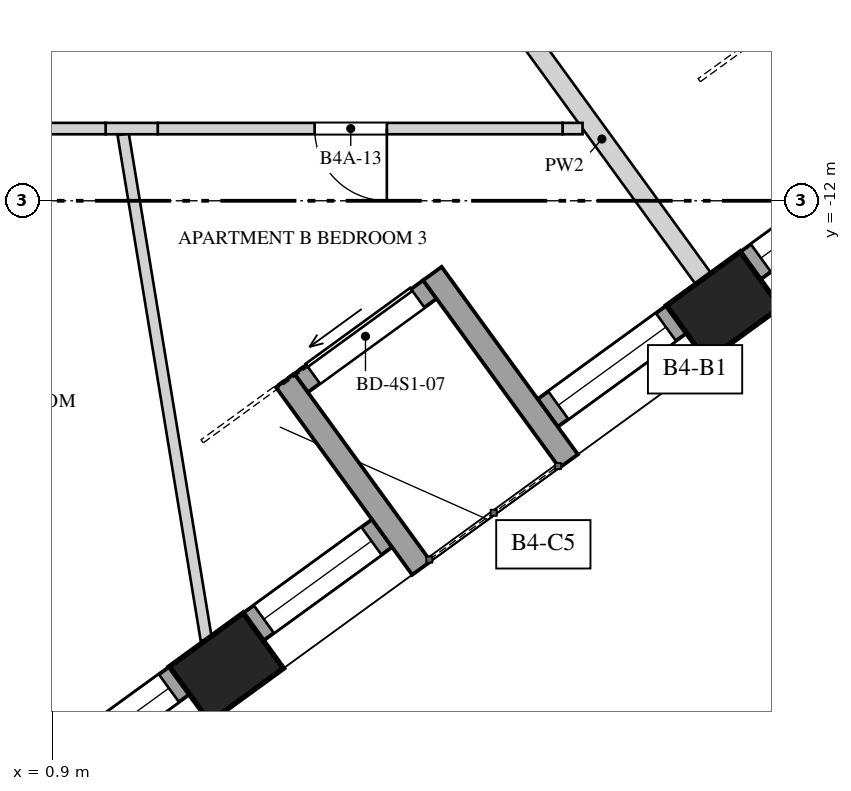
"""IFC4 building model, lengths in metres.
Left out: names, types, materials, properties, quantities, classifications, styles, units other than length and angle.
Written with IfcOpenShell. Run it as: python <this file> out.ifc"""

import sys

from ifc_helpers import new_model, si_unit, direction, frame, frame_2d, origin, origin_2d, place, context, subcontext, project, spatial, rectangle, extrude, element, fill, save


model = new_model("IFC4")
c1 = context("Model", 3, precision=1e-05, world=origin(), true_north=direction((0.0, 1.0)))
c2 = subcontext(c1, "Body", "Model", "MODEL_VIEW")
j1 = project(units=[si_unit("LENGTHUNIT", "METRE"), si_unit("PLANEANGLEUNIT", "RADIAN")], contexts=[c1])
p1 = place(None, origin())
s1 = spatial("IfcSite", under=j1, at=p1, CompositionType="ELEMENT")
p2 = place(p1, origin())
s2 = spatial("IfcBuilding", under=s1, at=p2, CompositionType="ELEMENT")
p3 = place(p2, frame((0.0, 0.0, 162.8)))
s3 = spatial("IfcBuildingStorey", under=s2, at=p3, CompositionType="ELEMENT", Elevation=162.8)
for number, where, z_axis, x_axis in (
    (1, (3.189, -18.14, -0.35), (0.0, 0.0, 1.0), (0.809, 0.588, 0.0)),
    (2, (9.728, -13.389, -0.35), (0.0, 0.0, 1.0), (0.809, 0.588, 0.0)),
):
    element("IfcColumn", number, at=place(p3, frame(where, z_axis=z_axis, x_axis=x_axis)), inside=s3, PredefinedType="COLUMN", context=c2, shape_type="SweptSolid", body=[
        extrude(rectangle(XDim=1.2, YDim=0.9, at=origin_2d()), origin(), (0.0, 0.0, 1.0), 4.35),
    ])
p4 = place(p3, frame((-2.997, -22.356, 0.0), z_axis=(0.0, 0.0, 1.0), x_axis=(0.809016690404, 0.587785670672, 0.0)))
e3 = element("IfcWall", 3, at=p4, inside=s3, PredefinedType="SOLIDWALL", context=c2, shape_type="SweptSolid", body=[
    extrude(rectangle(XDim=6.883, YDim=0.45, at=frame_2d((3.441, 0.0))), origin(), (0.0, 0.0, 1.0), 3.3),
])
p5 = place(p4, frame((0.497, 0.0, 0.5)))
e4 = element("IfcOpeningElement", 4, at=p5, cuts=e3, PredefinedType="OPENING", context=c2, shape_type="SweptSolid", body=[
    extrude(rectangle(XDim=1.1, YDim=2.65, at=frame_2d((0.55, 1.325))), frame((0.0, 0.235, 0.0), z_axis=(0.0, -1.0, 0.0), x_axis=(1.0, 0.0, 0.0)), (0.0, 0.0, 1.0), 0.47),
])
p6 = place(p4, frame((2.566, 0.0, 0.5)))
e5 = element("IfcOpeningElement", 5, at=p6, cuts=e3, PredefinedType="OPENING", context=c2, shape_type="SweptSolid", body=[
    extrude(rectangle(XDim=1.75, YDim=2.65, at=frame_2d((0.875, 1.325))), frame((0.0, 0.235, 0.0), z_axis=(0.0, -1.0, 0.0), x_axis=(1.0, 0.0, 0.0)), (0.0, 0.0, 1.0), 0.47),
])
p7 = place(p4, frame((4.961, 0.0, 0.5)))
e6 = element("IfcOpeningElement", 6, at=p7, cuts=e3, PredefinedType="OPENING", context=c2, shape_type="SweptSolid", body=[
    extrude(rectangle(XDim=1.75, YDim=2.65, at=frame_2d((0.875, 1.325))), frame((0.0, 0.235, 0.0), z_axis=(0.0, -1.0, 0.0), x_axis=(1.0, 0.0, 0.0)), (0.0, 0.0, 1.0), 0.47),
])
p8 = place(p3, frame((3.542, -17.605, 0.0), z_axis=(0.0, 0.0, 1.0), x_axis=(0.809028366311, 0.587769599847, 0.0)))
e7 = element("IfcWall", 7, at=p8, inside=s3, PredefinedType="SOLIDWALL", context=c2, shape_type="SweptSolid", body=[
    extrude(rectangle(XDim=2.094, YDim=0.45, at=frame_2d((1.047, 0.0))), origin(), (0.0, 0.0, 1.0), 3.3),
])
p9 = place(p8, frame((0.172, 0.0, 0.5)))
e8 = element("IfcOpeningElement", 8, at=p9, cuts=e7, PredefinedType="OPENING", context=c2, shape_type="SweptSolid", body=[
    extrude(rectangle(XDim=1.75, YDim=2.65, at=frame_2d((0.875, 1.325))), frame((0.0, 0.235, 0.0), z_axis=(0.0, -1.0, 0.0), x_axis=(1.0, 0.0, 0.0)), (0.0, 0.0, 1.0), 0.47),
])
p10 = place(p3, frame((7.416, -14.791, 0.0), z_axis=(0.0, 0.0, 1.0), x_axis=(0.809028366311, 0.587769599847, 0.0)))
e9 = element("IfcWall", 9, at=p10, inside=s3, PredefinedType="SOLIDWALL", context=c2, shape_type="SweptSolid", body=[
    extrude(rectangle(XDim=2.094, YDim=0.45, at=frame_2d((1.047, 0.0))), origin(), (0.0, 0.0, 1.0), 3.3),
])
p11 = place(p10, frame((0.172, 0.0, 0.5)))
e10 = element("IfcOpeningElement", 10, at=p11, cuts=e9, PredefinedType="OPENING", context=c2, shape_type="SweptSolid", body=[
    extrude(rectangle(XDim=1.75, YDim=2.65, at=frame_2d((0.875, 1.325))), frame((0.0, 0.235, 0.0), z_axis=(0.0, -1.0, 0.0), x_axis=(1.0, 0.0, 0.0)), (0.0, 0.0, 1.0), 0.47),
])
p12 = place(p3, frame((10.081, -12.854, 0.0), z_axis=(0.0, 0.0, 1.0), x_axis=(0.809028366311, 0.587769599847, 0.0)))
e11 = element("IfcWall", 11, at=p12, inside=s3, PredefinedType="SOLIDWALL", context=c2, shape_type="SweptSolid", body=[
    extrude(rectangle(XDim=2.094, YDim=0.45, at=frame_2d((1.047, 0.0))), origin(), (0.0, 0.0, 1.0), 3.3),
])
p13 = place(p12, frame((0.172, 0.0, 0.5)))
e12 = element("IfcOpeningElement", 12, at=p13, cuts=e11, PredefinedType="OPENING", context=c2, shape_type="SweptSolid", body=[
    extrude(rectangle(XDim=1.75, YDim=2.65, at=frame_2d((0.875, 1.325))), frame((0.0, 0.235, 0.0), z_axis=(0.0, -1.0, 0.0), x_axis=(1.0, 0.0, 0.0)), (0.0, 0.0, 1.0), 0.47),
])
p14 = place(p3, frame((4.171, -14.398, 0.0), z_axis=(0.0, 0.0, 1.0), x_axis=(0.809028366311, 0.587769599847, 0.0)))
e13 = element("IfcWall", 13, at=p14, inside=s3, PredefinedType="SOLIDWALL", context=c2, shape_type="SweptSolid", body=[
    extrude(rectangle(XDim=2.094, YDim=0.3, at=frame_2d((1.047, 0.0))), origin(), (0.0, 0.0, 1.0), 3.3),
])
p15 = place(p14, frame((0.197, 0.0, 0.0)))
e14 = element("IfcOpeningElement", 14, at=p15, cuts=e13, PredefinedType="OPENING", context=c2, shape_type="SweptSolid", body=[
    extrude(rectangle(XDim=1.7, YDim=2.45, at=frame_2d((0.85, 1.225))), frame((0.0, 0.16, 0.0), z_axis=(0.0, -1.0, 0.0), x_axis=(1.0, 0.0, 0.0)), (0.0, 0.0, 1.0), 0.32),
])
for number, where, z_axis, x_axis in (
    (15, (5.754, -16.833, 0.0), (0.0, 0.0, 1.0), (-0.588, 0.809, 0.0)),
    (16, (7.691, -15.425, 0.0), (0.0, 0.0, 1.0), (-0.588, 0.809, 0.0)),
):
    element("IfcWall", number, at=place(p3, frame(where, z_axis=z_axis, x_axis=x_axis)), inside=s3, PredefinedType="SOLIDWALL", context=c2, shape_type="SweptSolid", body=[
        extrude(rectangle(XDim=3.05, YDim=0.3, at=frame_2d((1.525, 0.0))), origin(), (0.0, 0.0, 1.0), 3.3),
    ])
p16 = place(p3, frame((1.83, -11.125, 0.0), z_axis=(0.0, 0.0, 1.0), x_axis=(0.162301772149, -0.98674116908, 0.0)))
e17 = element("IfcWall", 17, at=p16, inside=s3, PredefinedType="PARTITIONING", context=c2, shape_type="SweptSolid", body=[
    extrude(rectangle(XDim=6.74, YDim=0.15, at=frame_2d((3.37, 0.0))), origin(), (0.0, 0.0, 1.0), 2.95),
])
p17 = place(p3, frame((6.793, -9.35, 0.0), z_axis=(0.0, 0.0, 1.0), x_axis=(0.587797751126, -0.809007913294, 0.0)))
e18 = element("IfcWall", 18, at=p17, inside=s3, PredefinedType="SOLIDWALL", context=c2, shape_type="SweptSolid", body=[
    extrude(rectangle(XDim=4.543, YDim=0.25, at=frame_2d((2.271, 0.0))), origin(), (0.0, 0.0, 1.0), 2.95),
])
p18 = place(p3, frame((7.874, -11.05, 0.0), z_axis=(0.0, 0.0, 1.0), x_axis=(-1.0, 0.0, 0.0)))
e19 = element("IfcWall", 19, at=p18, inside=s3, PredefinedType="PARTITIONING", context=c2, shape_type="SweptSolid", body=[
    extrude(rectangle(XDim=0.263, YDim=0.15, at=frame_2d((0.131, 0.0))), origin(), (0.0, 0.0, 1.0), 2.95),
])
p19 = place(p3, frame((7.611, -11.05, 0.0), z_axis=(0.0, 0.0, 1.0), x_axis=(-1.0, 0.0, 0.0)))
e20 = element("IfcWall", 20, at=p19, inside=s3, PredefinedType="PARTITIONING", context=c2, shape_type="SweptSolid", body=[
    extrude(rectangle(XDim=5.326, YDim=0.15, at=frame_2d((2.663, 0.0))), origin(), (0.0, 0.0, 1.0), 3.65),
])
p20 = place(p19, frame((2.312, 0.0, 0.0)))
e21 = element("IfcOpeningElement", 21, at=p20, cuts=e20, PredefinedType="OPENING", context=c2, shape_type="SweptSolid", body=[
    extrude(rectangle(XDim=0.95, YDim=2.4, at=frame_2d((0.475, 1.2))), frame((0.0, 0.085, 0.0), z_axis=(0.0, -1.0, 0.0), x_axis=(1.0, 0.0, 0.0)), (0.0, 0.0, 1.0), 0.17),
])
p21 = place(p3, frame((2.285, -11.05, 0.0), z_axis=(0.0, 0.0, 1.0), x_axis=(-1.0, 0.0, 0.0)))
e22 = element("IfcWall", 22, at=p21, inside=s3, PredefinedType="PARTITIONING", context=c2, shape_type="SweptSolid", body=[
    extrude(rectangle(XDim=0.685, YDim=0.15, at=frame_2d((0.343, 0.0))), origin(), (0.0, 0.0, 1.0), 2.95),
])
p22 = place(p3, frame((1.6, -11.05, 0.0), z_axis=(0.0, 0.0, 1.0), x_axis=(-1.0, 0.0, 0.0)))
e23 = element("IfcWall", 23, at=p22, inside=s3, PredefinedType="PARTITIONING", context=c2, shape_type="SweptSolid", body=[
    extrude(rectangle(XDim=2.775, YDim=0.15, at=frame_2d((1.387, 0.0))), origin(), (0.0, 0.0, 1.0), 3.65),
])
p23 = place(p22, frame((1.103, 0.0, 0.0)))
e24 = element("IfcOpeningElement", 24, at=p23, cuts=e23, PredefinedType="OPENING", context=c2, shape_type="SweptSolid", body=[
    extrude(rectangle(XDim=0.95, YDim=2.4, at=frame_2d((0.475, 1.2))), frame((0.0, 0.085, 0.0), z_axis=(0.0, -1.0, 0.0), x_axis=(1.0, 0.0, 0.0)), (0.0, 0.0, 1.0), 0.17),
])
p24 = place(p7, origin())
e25 = element("IfcWindow", 25, at=p24, inside=s3, PartitioningType="SINGLE_PANEL", PredefinedType="WINDOW", context=c2, shape_type="SweptSolid", body=[
    extrude(rectangle(XDim=1.75, YDim=2.65, at=frame_2d((0.875, 1.325))), frame((0.0, 0.03, 0.0), z_axis=(0.0, -1.0, 0.0), x_axis=(1.0, 0.0, 0.0)), (0.0, 0.0, 1.0), 0.06),
])
fill(e6, e25)
p25 = place(p9, origin())
e26 = element("IfcWindow", 26, at=p25, inside=s3, PartitioningType="SINGLE_PANEL", PredefinedType="WINDOW", context=c2, shape_type="SweptSolid", body=[
    extrude(rectangle(XDim=1.75, YDim=2.65, at=frame_2d((0.875, 1.325))), frame((0.0, 0.03, 0.0), z_axis=(0.0, -1.0, 0.0), x_axis=(1.0, 0.0, 0.0)), (0.0, 0.0, 1.0), 0.06),
])
fill(e8, e26)
p26 = place(p11, origin())
e27 = element("IfcWindow", 27, at=p26, inside=s3, PartitioningType="SINGLE_PANEL", PredefinedType="WINDOW", context=c2, shape_type="SweptSolid", body=[
    extrude(rectangle(XDim=1.75, YDim=2.65, at=frame_2d((0.875, 1.325))), frame((0.0, 0.03, 0.0), z_axis=(0.0, -1.0, 0.0), x_axis=(1.0, 0.0, 0.0)), (0.0, 0.0, 1.0), 0.06),
])
fill(e10, e27)
p27 = place(p13, origin())
e28 = element("IfcWindow", 28, at=p27, inside=s3, PartitioningType="SINGLE_PANEL", PredefinedType="WINDOW", context=c2, shape_type="SweptSolid", body=[
    extrude(rectangle(XDim=1.75, YDim=2.65, at=frame_2d((0.875, 1.325))), frame((0.0, 0.03, 0.0), z_axis=(0.0, -1.0, 0.0), x_axis=(1.0, 0.0, 0.0)), (0.0, 0.0, 1.0), 0.06),
])
fill(e12, e28)
p28 = place(p15, origin())
e29 = element("IfcDoor", 29, at=p28, inside=s3, OperationType="SLIDING_TO_LEFT", PredefinedType="DOOR", context=c2, shape_type="SweptSolid", body=[
    extrude(rectangle(XDim=1.7, YDim=2.45, at=frame_2d((0.85, 1.225))), frame((0.0, 0.025, 0.0), z_axis=(0.0, -1.0, 0.0), x_axis=(1.0, 0.0, 0.0)), (0.0, 0.0, 1.0), 0.05),
])
fill(e14, e29)
p29 = place(p20, origin())
e30 = element("IfcDoor", 30, at=p29, inside=s3, OperationType="SINGLE_SWING_LEFT", PredefinedType="DOOR", context=c2, shape_type="SweptSolid", body=[
    extrude(rectangle(XDim=0.95, YDim=2.4, at=frame_2d((0.475, 1.2))), frame((0.0, 0.025, 0.0), z_axis=(0.0, -1.0, 0.0), x_axis=(1.0, 0.0, 0.0)), (0.0, 0.0, 1.0), 0.05),
])
fill(e21, e30)
save(model, sys.argv[1])
